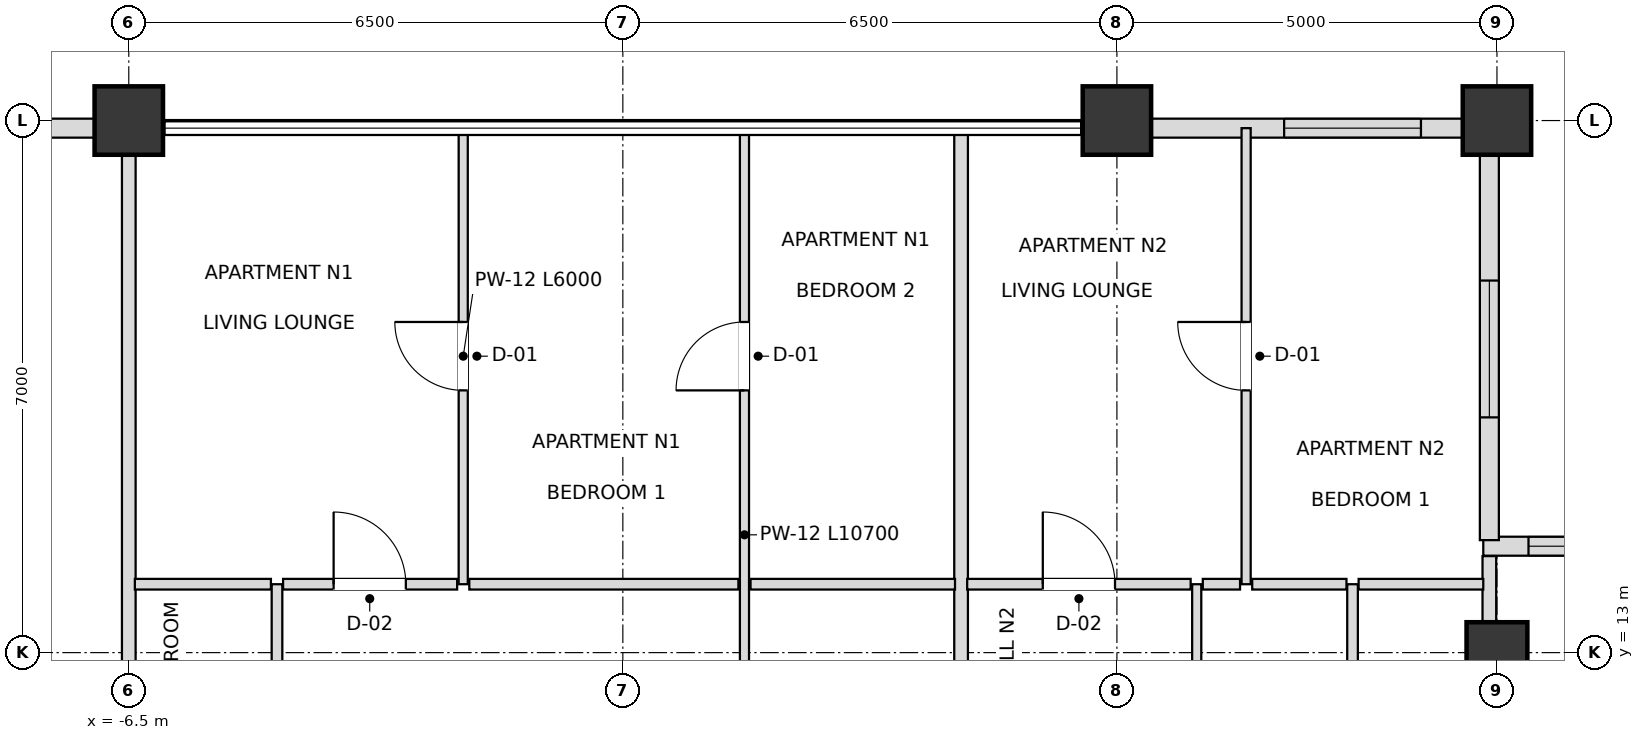
"""IFC4 building model, lengths in metres.
Left out: names, types, materials, properties, quantities, classifications, styles, units other than length and angle.
Written with IfcOpenShell. Run it as: python <this file> out.ifc"""

import sys

from ifc_helpers import new_model, si_unit, direction, frame, frame_2d, origin, origin_2d, place, context, subcontext, project, spatial, rectangle, extrude, element, fill, save


model = new_model("IFC4")
c1 = context("Model", 3, precision=1e-05, world=origin(), true_north=direction((0.0, 1.0)))
c2 = subcontext(c1, "Body", "Model", "MODEL_VIEW")
j1 = project(units=[si_unit("LENGTHUNIT", "METRE"), si_unit("PLANEANGLEUNIT", "RADIAN")], contexts=[c1])
p1 = place(None, origin())
s1 = spatial("IfcSite", under=j1, at=p1, CompositionType="ELEMENT")
p2 = place(p1, origin())
s2 = spatial("IfcBuilding", under=s1, at=p2, CompositionType="ELEMENT")
p3 = place(p2, frame((0.0, 0.0, 254.7)))
s3 = spatial("IfcBuildingStorey", under=s2, at=p3, CompositionType="ELEMENT", Elevation=254.7)
for number, where, z_axis, x_axis in (
    (1, (11.5, 20.0, 0.0), (0.0, 0.0, 1.0), (1.0, 0.0, 0.0)),
    (2, (6.5, 20.0, 0.0), (0.0, 0.0, 1.0), (1.0, 0.0, 0.0)),
    (3, (-6.5, 20.0, 0.0), (0.0, 0.0, 1.0), (1.0, 0.0, 0.0)),
):
    element("IfcColumn", number, at=place(p3, frame(where, z_axis=z_axis, x_axis=x_axis)), inside=s3, PredefinedType="USERDEFINED", context=c2, shape_type="SweptSolid", body=[
        extrude(rectangle(XDim=0.9, YDim=0.9, at=origin_2d()), origin(), (0.0, 0.0, 1.0), 3.6),
    ])
p4 = place(p3, frame((11.5, 13.0, 0.0), z_axis=(0.0, 0.0, 1.0), x_axis=(1.0, 0.0, 0.0)))
e4 = element("IfcColumn", 4, at=p4, inside=s3, PredefinedType="COLUMN", context=c2, shape_type="SweptSolid", body=[
    extrude(rectangle(XDim=0.8, YDim=0.8, at=origin_2d()), origin(), (0.0, 0.0, 1.0), 3.6),
])
p5 = place(p3, frame((11.055, 19.9, 0.0), z_axis=(0.0, 0.0, 1.0), x_axis=(-1.0, 0.0, 0.0)))
e5 = element("IfcWall", 5, at=p5, inside=s3, PredefinedType="SOLIDWALL", context=c2, shape_type="SweptSolid", body=[
    extrude(rectangle(XDim=4.11, YDim=0.25, at=frame_2d((2.055, 0.0))), origin(), (0.0, 0.0, 1.0), 2.748),
])
p6 = place(p5, frame((0.555, 0.0, 0.72)))
e6 = element("IfcOpeningElement", 6, at=p6, cuts=e5, PredefinedType="OPENING", context=c2, shape_type="SweptSolid", body=[
    extrude(rectangle(XDim=1.8, YDim=1.68, at=frame_2d((0.9, 0.84))), frame((0.0, 0.135, 0.0), z_axis=(0.0, -1.0, 0.0), x_axis=(1.0, 0.0, 0.0)), (0.0, 0.0, 1.0), 0.27),
])
p7 = place(p3, frame((-6.945, 19.9, 0.0), z_axis=(0.0, 0.0, 1.0), x_axis=(-1.0, 0.0, 0.0)))
e7 = element("IfcWall", 7, at=p7, inside=s3, PredefinedType="SOLIDWALL", context=c2, shape_type="SweptSolid", body=[
    extrude(rectangle(XDim=4.11, YDim=0.25, at=frame_2d((2.055, 0.0))), origin(), (0.0, 0.0, 1.0), 2.748),
])
p8 = place(p7, frame((1.155, 0.0, 0.72)))
e8 = element("IfcOpeningElement", 8, at=p8, cuts=e7, PredefinedType="OPENING", context=c2, shape_type="SweptSolid", body=[
    extrude(rectangle(XDim=1.8, YDim=1.68, at=frame_2d((0.9, 0.84))), frame((0.0, 0.135, 0.0), z_axis=(0.0, -1.0, 0.0), x_axis=(1.0, 0.0, 0.0)), (0.0, 0.0, 1.0), 0.27),
])
p9 = place(p3, frame((16.98, 14.4, 0.0), z_axis=(0.0, 0.0, 1.0), x_axis=(-1.0, 0.0, 0.0)))
e9 = element("IfcWall", 9, at=p9, inside=s3, PredefinedType="SOLIDWALL", context=c2, shape_type="SweptSolid", body=[
    extrude(rectangle(XDim=5.66, YDim=0.25, at=frame_2d((2.83, 0.0))), origin(), (0.0, 0.0, 1.0), 2.748),
])
p10 = place(p9, frame((0.595, 0.0, 0.72)))
e10 = element("IfcOpeningElement", 10, at=p10, cuts=e9, PredefinedType="OPENING", context=c2, shape_type="SweptSolid", body=[
    extrude(rectangle(XDim=1.8, YDim=1.68, at=frame_2d((0.9, 0.84))), frame((0.0, 0.135, 0.0), z_axis=(0.0, -1.0, 0.0), x_axis=(1.0, 0.0, 0.0)), (0.0, 0.0, 1.0), 0.27),
])
p11 = place(p9, frame((3.265, 0.0, 0.72)))
e11 = element("IfcOpeningElement", 11, at=p11, cuts=e9, PredefinedType="OPENING", context=c2, shape_type="SweptSolid", body=[
    extrude(rectangle(XDim=1.8, YDim=1.68, at=frame_2d((0.9, 0.84))), frame((0.0, 0.135, 0.0), z_axis=(0.0, -1.0, 0.0), x_axis=(1.0, 0.0, 0.0)), (0.0, 0.0, 1.0), 0.27),
])
p12 = place(p3, frame((11.4, 14.48, 0.0), z_axis=(0.0, 0.0, 1.0), x_axis=(0.0, 1.0, 0.0)))
e12 = element("IfcWall", 12, at=p12, inside=s3, PredefinedType="SOLIDWALL", context=c2, shape_type="SweptSolid", body=[
    extrude(rectangle(XDim=5.34, YDim=0.25, at=frame_2d((2.67, 0.0))), origin(), (0.0, 0.0, 1.0), 2.748),
])
p13 = place(p12, frame((1.615, 0.0, 0.72)))
e13 = element("IfcOpeningElement", 13, at=p13, cuts=e12, PredefinedType="OPENING", context=c2, shape_type="SweptSolid", body=[
    extrude(rectangle(XDim=1.8, YDim=1.68, at=frame_2d((0.9, 0.84))), frame((0.0, 0.135, 0.0), z_axis=(0.0, -1.0, 0.0), x_axis=(1.0, 0.0, 0.0)), (0.0, 0.0, 1.0), 0.27),
])
p14 = place(p3, frame((-6.5, 9.2, 0.0), z_axis=(0.0, 0.0, 1.0), x_axis=(0.0, 1.0, 0.0)))
e14 = element("IfcWall", 14, at=p14, inside=s3, PredefinedType="PARTITIONING", context=c2, shape_type="SweptSolid", body=[
    extrude(rectangle(XDim=10.7, YDim=0.18, at=frame_2d((5.35, 0.0))), origin(), (0.0, 0.0, 1.0), 2.826),
])
p15 = place(p3, frame((-4.55, 9.2, 0.0), z_axis=(0.0, 0.0, 1.0), x_axis=(0.0, 1.0, 0.0)))
e15 = element("IfcWall", 15, at=p15, inside=s3, PredefinedType="PARTITIONING", context=c2, shape_type="SweptSolid", body=[
    extrude(rectangle(XDim=4.7, YDim=0.14, at=frame_2d((2.35, 0.0))), origin(), (0.0, 0.0, 1.0), 3.38),
])
p16 = place(p15, frame((1.9, 0.0, 0.0)))
e16 = element("IfcOpeningElement", 16, at=p16, cuts=e15, PredefinedType="OPENING", context=c2, shape_type="SweptSolid", body=[
    extrude(rectangle(XDim=0.9, YDim=2.1, at=frame_2d((0.45, 1.05))), frame((0.0, 0.08, 0.0), z_axis=(0.0, -1.0, 0.0), x_axis=(1.0, 0.0, 0.0)), (0.0, 0.0, 1.0), 0.16),
])
p17 = place(p3, frame((-2.1, 13.9, 0.0), z_axis=(0.0, 0.0, 1.0), x_axis=(0.0, 1.0, 0.0)))
e17 = element("IfcWall", 17, at=p17, inside=s3, PredefinedType="PARTITIONING", context=c2, shape_type="SweptSolid", body=[
    extrude(rectangle(XDim=6.0, YDim=0.12, at=frame_2d((3.0, 0.0))), origin(), (0.0, 0.0, 1.0), 3.018),
])
p18 = place(p17, frame((2.55, 0.0, 0.0)))
e18 = element("IfcOpeningElement", 18, at=p18, cuts=e17, PredefinedType="OPENING", context=c2, shape_type="SweptSolid", body=[
    extrude(rectangle(XDim=0.9, YDim=2.1, at=frame_2d((0.45, 1.05))), frame((0.0, 0.07, 0.0), z_axis=(0.0, -1.0, 0.0), x_axis=(1.0, 0.0, 0.0)), (0.0, 0.0, 1.0), 0.14),
])
p19 = place(p3, frame((1.6, 9.2, 0.0), z_axis=(0.0, 0.0, 1.0), x_axis=(0.0, 1.0, 0.0)))
e19 = element("IfcWall", 19, at=p19, inside=s3, PredefinedType="PARTITIONING", context=c2, shape_type="SweptSolid", body=[
    extrude(rectangle(XDim=10.7, YDim=0.12, at=frame_2d((5.35, 0.0))), origin(), (0.0, 0.0, 1.0), 3.018),
])
p20 = place(p19, frame((1.875, 0.0, 0.0)))
e20 = element("IfcOpeningElement", 20, at=p20, cuts=e19, PredefinedType="OPENING", context=c2, shape_type="SweptSolid", body=[
    extrude(rectangle(XDim=0.95, YDim=2.1, at=frame_2d((0.475, 1.05))), frame((0.0, 0.07, 0.0), z_axis=(0.0, -1.0, 0.0), x_axis=(1.0, 0.0, 0.0)), (0.0, 0.0, 1.0), 0.14),
])
p21 = place(p19, frame((7.25, 0.0, 0.0)))
e21 = element("IfcOpeningElement", 21, at=p21, cuts=e19, PredefinedType="OPENING", context=c2, shape_type="SweptSolid", body=[
    extrude(rectangle(XDim=0.9, YDim=2.1, at=frame_2d((0.45, 1.05))), frame((0.0, 0.07, 0.0), z_axis=(0.0, -1.0, 0.0), x_axis=(1.0, 0.0, 0.0)), (0.0, 0.0, 1.0), 0.14),
])
p22 = place(p3, frame((4.45, 9.2, 0.0), z_axis=(0.0, 0.0, 1.0), x_axis=(0.0, 1.0, 0.0)))
e22 = element("IfcWall", 22, at=p22, inside=s3, PredefinedType="PARTITIONING", context=c2, shape_type="SweptSolid", body=[
    extrude(rectangle(XDim=10.7, YDim=0.18, at=frame_2d((5.35, 0.0))), origin(), (0.0, 0.0, 1.0), 3.018),
])
p23 = place(p3, frame((7.55, 9.2, 0.0), z_axis=(0.0, 0.0, 1.0), x_axis=(0.0, 1.0, 0.0)))
e23 = element("IfcWall", 23, at=p23, inside=s3, PredefinedType="PARTITIONING", context=c2, shape_type="SweptSolid", body=[
    extrude(rectangle(XDim=4.7, YDim=0.12, at=frame_2d((2.35, 0.0))), origin(), (0.0, 0.0, 1.0), 2.826),
])
p24 = place(p23, frame((1.875, 0.0, 0.0)))
e24 = element("IfcOpeningElement", 24, at=p24, cuts=e23, PredefinedType="OPENING", context=c2, shape_type="SweptSolid", body=[
    extrude(rectangle(XDim=0.95, YDim=2.1, at=frame_2d((0.475, 1.05))), frame((0.0, 0.07, 0.0), z_axis=(0.0, -1.0, 0.0), x_axis=(1.0, 0.0, 0.0)), (0.0, 0.0, 1.0), 0.14),
])
p25 = place(p3, frame((8.2, 13.9, 0.0), z_axis=(0.0, 0.0, 1.0), x_axis=(0.0, 1.0, 0.0)))
e25 = element("IfcWall", 25, at=p25, inside=s3, PredefinedType="PARTITIONING", context=c2, shape_type="SweptSolid", body=[
    extrude(rectangle(XDim=6.0, YDim=0.12, at=frame_2d((3.0, 0.0))), origin(), (0.0, 0.0, 1.0), 3.38),
])
p26 = place(p25, frame((2.55, 0.0, 0.0)))
e26 = element("IfcOpeningElement", 26, at=p26, cuts=e25, PredefinedType="OPENING", context=c2, shape_type="SweptSolid", body=[
    extrude(rectangle(XDim=0.9, YDim=2.1, at=frame_2d((0.45, 1.05))), frame((0.0, 0.07, 0.0), z_axis=(0.0, -1.0, 0.0), x_axis=(1.0, 0.0, 0.0)), (0.0, 0.0, 1.0), 0.14),
])
p27 = place(p3, frame((9.6, 9.2, 0.0), z_axis=(0.0, 0.0, 1.0), x_axis=(0.0, 1.0, 0.0)))
e27 = element("IfcWall", 27, at=p27, inside=s3, PredefinedType="PARTITIONING", context=c2, shape_type="SweptSolid", body=[
    extrude(rectangle(XDim=4.7, YDim=0.14, at=frame_2d((2.35, 0.0))), origin(), (0.0, 0.0, 1.0), 2.826),
])
p28 = place(p27, frame((1.9, 0.0, 0.0)))
e28 = element("IfcOpeningElement", 28, at=p28, cuts=e27, PredefinedType="OPENING", context=c2, shape_type="SweptSolid", body=[
    extrude(rectangle(XDim=0.9, YDim=2.1, at=frame_2d((0.45, 1.05))), frame((0.0, 0.08, 0.0), z_axis=(0.0, -1.0, 0.0), x_axis=(1.0, 0.0, 0.0)), (0.0, 0.0, 1.0), 0.16),
])
p29 = place(p3, frame((11.4, 9.2, 0.0), z_axis=(0.0, 0.0, 1.0), x_axis=(0.0, 1.0, 0.0)))
e29 = element("IfcWall", 29, at=p29, inside=s3, PredefinedType="PARTITIONING", context=c2, shape_type="SweptSolid", body=[
    extrude(rectangle(XDim=5.07, YDim=0.18, at=frame_2d((2.535, 0.0))), origin(), (0.0, 0.0, 1.0), 2.748),
])
p30 = place(p3, frame((-6.42, 13.9, 0.0), z_axis=(0.0, 0.0, 1.0), x_axis=(1.0, 0.0, 0.0)))
e30 = element("IfcWall", 30, at=p30, inside=s3, PredefinedType="PARTITIONING", context=c2, shape_type="SweptSolid", body=[
    extrude(rectangle(XDim=1.79, YDim=0.14, at=frame_2d((0.895, 0.0))), origin(), (0.0, 0.0, 1.0), 3.38),
])
p31 = place(p3, frame((-4.47, 13.9, 0.0), z_axis=(0.0, 0.0, 1.0), x_axis=(1.0, 0.0, 0.0)))
e31 = element("IfcWall", 31, at=p31, inside=s3, PredefinedType="PARTITIONING", context=c2, shape_type="SweptSolid", body=[
    extrude(rectangle(XDim=2.29, YDim=0.14, at=frame_2d((1.145, 0.0))), origin(), (0.0, 0.0, 1.0), 3.38),
])
p32 = place(p31, frame((0.665, 0.0, 0.0)))
e32 = element("IfcOpeningElement", 32, at=p32, cuts=e31, PredefinedType="OPENING", context=c2, shape_type="SweptSolid", body=[
    extrude(rectangle(XDim=0.95, YDim=2.1, at=frame_2d((0.475, 1.05))), frame((0.0, 0.08, 0.0), z_axis=(0.0, -1.0, 0.0), x_axis=(1.0, 0.0, 0.0)), (0.0, 0.0, 1.0), 0.16),
])
p33 = place(p3, frame((-2.02, 13.9, 0.0), z_axis=(0.0, 0.0, 1.0), x_axis=(1.0, 0.0, 0.0)))
e33 = element("IfcWall", 33, at=p33, inside=s3, PredefinedType="PARTITIONING", context=c2, shape_type="SweptSolid", body=[
    extrude(rectangle(XDim=3.54, YDim=0.14, at=frame_2d((1.77, 0.0))), origin(), (0.0, 0.0, 1.0), 3.38),
])
p34 = place(p3, frame((1.68, 13.9, 0.0), z_axis=(0.0, 0.0, 1.0), x_axis=(1.0, 0.0, 0.0)))
e34 = element("IfcWall", 34, at=p34, inside=s3, PredefinedType="PARTITIONING", context=c2, shape_type="SweptSolid", body=[
    extrude(rectangle(XDim=2.69, YDim=0.14, at=frame_2d((1.345, 0.0))), origin(), (0.0, 0.0, 1.0), 3.38),
])
p35 = place(p3, frame((4.53, 13.9, 0.0), z_axis=(0.0, 0.0, 1.0), x_axis=(1.0, 0.0, 0.0)))
e35 = element("IfcWall", 35, at=p35, inside=s3, PredefinedType="PARTITIONING", context=c2, shape_type="SweptSolid", body=[
    extrude(rectangle(XDim=2.94, YDim=0.14, at=frame_2d((1.47, 0.0))), origin(), (0.0, 0.0, 1.0), 2.826),
])
p36 = place(p35, frame((0.995, 0.0, 0.0)))
e36 = element("IfcOpeningElement", 36, at=p36, cuts=e35, PredefinedType="OPENING", context=c2, shape_type="SweptSolid", body=[
    extrude(rectangle(XDim=0.95, YDim=2.1, at=frame_2d((0.475, 1.05))), frame((0.0, 0.08, 0.0), z_axis=(0.0, -1.0, 0.0), x_axis=(1.0, 0.0, 0.0)), (0.0, 0.0, 1.0), 0.16),
])
p37 = place(p3, frame((7.63, 13.9, 0.0), z_axis=(0.0, 0.0, 1.0), x_axis=(1.0, 0.0, 0.0)))
e37 = element("IfcWall", 37, at=p37, inside=s3, PredefinedType="PARTITIONING", context=c2, shape_type="SweptSolid", body=[
    extrude(rectangle(XDim=0.49, YDim=0.14, at=frame_2d((0.245, 0.0))), origin(), (0.0, 0.0, 1.0), 3.38),
])
p38 = place(p3, frame((8.28, 13.9, 0.0), z_axis=(0.0, 0.0, 1.0), x_axis=(1.0, 0.0, 0.0)))
e38 = element("IfcWall", 38, at=p38, inside=s3, PredefinedType="PARTITIONING", context=c2, shape_type="SweptSolid", body=[
    extrude(rectangle(XDim=1.24, YDim=0.14, at=frame_2d((0.62, 0.0))), origin(), (0.0, 0.0, 1.0), 3.38),
])
p39 = place(p3, frame((9.68, 13.9, 0.0), z_axis=(0.0, 0.0, 1.0), x_axis=(1.0, 0.0, 0.0)))
e39 = element("IfcWall", 39, at=p39, inside=s3, PredefinedType="PARTITIONING", context=c2, shape_type="SweptSolid", body=[
    extrude(rectangle(XDim=1.64, YDim=0.14, at=frame_2d((0.82, 0.0))), origin(), (0.0, 0.0, 1.0), 3.38),
])
p40 = place(p6, origin())
e40 = element("IfcWindow", 40, at=p40, inside=s3, PartitioningType="SINGLE_PANEL", PredefinedType="WINDOW", context=c2, shape_type="SweptSolid", body=[
    extrude(rectangle(XDim=1.8, YDim=1.68, at=frame_2d((0.9, 0.84))), frame((0.0, 0.03, 0.0), z_axis=(0.0, -1.0, 0.0), x_axis=(1.0, 0.0, 0.0)), (0.0, 0.0, 1.0), 0.06),
])
fill(e6, e40)
p41 = place(p11, origin())
e41 = element("IfcWindow", 41, at=p41, inside=s3, PartitioningType="SINGLE_PANEL", PredefinedType="WINDOW", context=c2, shape_type="SweptSolid", body=[
    extrude(rectangle(XDim=1.8, YDim=1.68, at=frame_2d((0.9, 0.84))), frame((0.0, 0.03, 0.0), z_axis=(0.0, -1.0, 0.0), x_axis=(1.0, 0.0, 0.0)), (0.0, 0.0, 1.0), 0.06),
])
fill(e11, e41)
p42 = place(p13, origin())
e42 = element("IfcWindow", 42, at=p42, inside=s3, PartitioningType="SINGLE_PANEL", PredefinedType="WINDOW", context=c2, shape_type="SweptSolid", body=[
    extrude(rectangle(XDim=1.8, YDim=1.68, at=frame_2d((0.9, 0.84))), frame((0.0, 0.03, 0.0), z_axis=(0.0, -1.0, 0.0), x_axis=(1.0, 0.0, 0.0)), (0.0, 0.0, 1.0), 0.06),
])
fill(e13, e42)
p43 = place(p32, origin())
e43 = element("IfcDoor", 43, at=p43, inside=s3, OperationType="SINGLE_SWING_LEFT", PredefinedType="DOOR", context=c2, shape_type="SweptSolid", body=[
    extrude(rectangle(XDim=0.95, YDim=2.1, at=frame_2d((0.475, 1.05))), frame((0.0, 0.025, 0.0), z_axis=(0.0, -1.0, 0.0), x_axis=(1.0, 0.0, 0.0)), (0.0, 0.0, 1.0), 0.05),
])
fill(e32, e43)
p44 = place(p18, origin())
e44 = element("IfcDoor", 44, at=p44, inside=s3, OperationType="SINGLE_SWING_RIGHT", PredefinedType="DOOR", context=c2, shape_type="SweptSolid", body=[
    extrude(rectangle(XDim=0.9, YDim=2.1, at=frame_2d((0.45, 1.05))), frame((0.0, 0.025, 0.0), z_axis=(0.0, -1.0, 0.0), x_axis=(1.0, 0.0, 0.0)), (0.0, 0.0, 1.0), 0.05),
])
fill(e18, e44)
p45 = place(p21, origin())
e45 = element("IfcDoor", 45, at=p45, inside=s3, OperationType="SINGLE_SWING_LEFT", PredefinedType="DOOR", context=c2, shape_type="SweptSolid", body=[
    extrude(rectangle(XDim=0.9, YDim=2.1, at=frame_2d((0.45, 1.05))), frame((0.0, 0.025, 0.0), z_axis=(0.0, -1.0, 0.0), x_axis=(1.0, 0.0, 0.0)), (0.0, 0.0, 1.0), 0.05),
])
fill(e21, e45)
p46 = place(p36, origin())
e46 = element("IfcDoor", 46, at=p46, inside=s3, OperationType="SINGLE_SWING_LEFT", PredefinedType="DOOR", context=c2, shape_type="SweptSolid", body=[
    extrude(rectangle(XDim=0.95, YDim=2.1, at=frame_2d((0.475, 1.05))), frame((0.0, 0.025, 0.0), z_axis=(0.0, -1.0, 0.0), x_axis=(1.0, 0.0, 0.0)), (0.0, 0.0, 1.0), 0.05),
])
fill(e36, e46)
p47 = place(p26, origin())
e47 = element("IfcDoor", 47, at=p47, inside=s3, OperationType="SINGLE_SWING_RIGHT", PredefinedType="DOOR", context=c2, shape_type="SweptSolid", body=[
    extrude(rectangle(XDim=0.9, YDim=2.1, at=frame_2d((0.45, 1.05))), frame((0.0, 0.025, 0.0), z_axis=(0.0, -1.0, 0.0), x_axis=(1.0, 0.0, 0.0)), (0.0, 0.0, 1.0), 0.05),
])
fill(e26, e47)
save(model, sys.argv[1])
